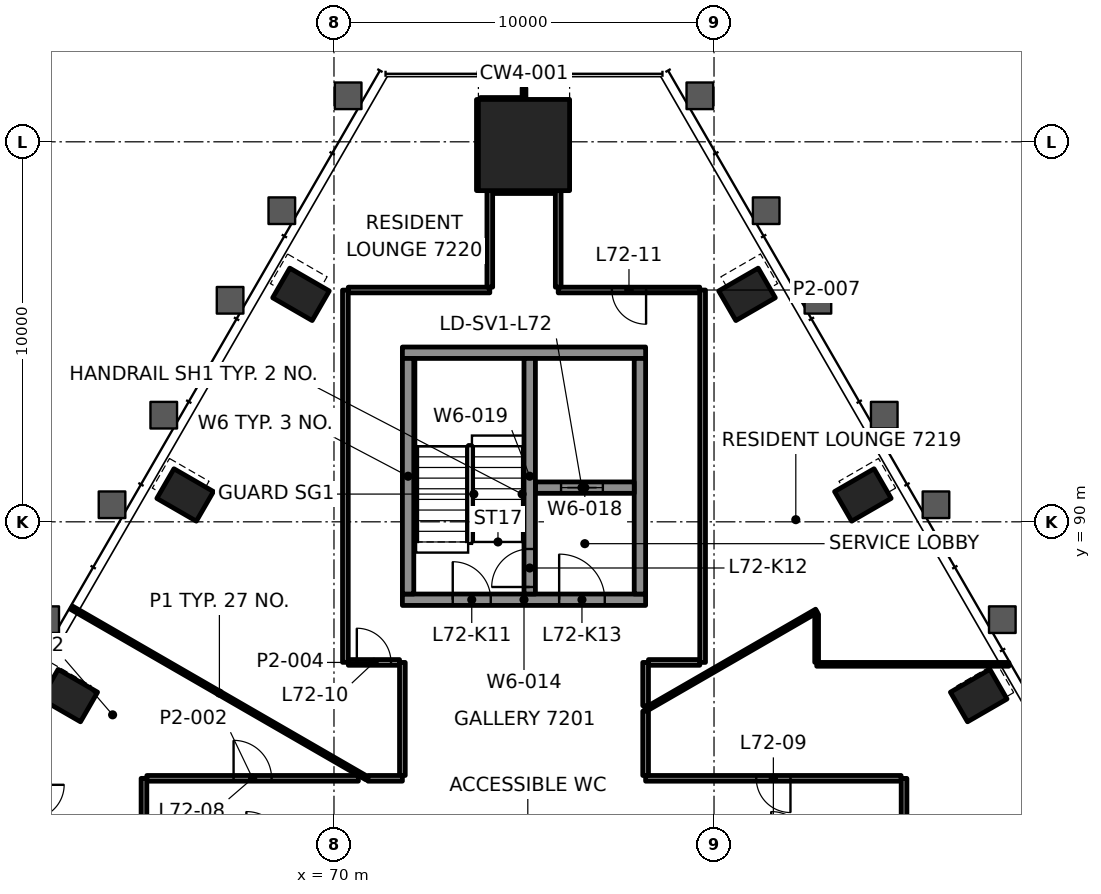
"""IFC4 building model, lengths in metres.
Left out: names, types, materials, properties, quantities, classifications, styles, units other than length and angle.
Written with IfcOpenShell. Run it as: python <this file> out.ifc"""

import sys

from ifc_helpers import new_model, si_unit, direction, frame, frame_2d, origin, origin_2d, place, context, subcontext, project, spatial, rectangle, hollow_rectangle, extrude, element, fill, save


model = new_model("IFC4")
c1 = context("Model", 3, precision=1e-05, world=origin(), true_north=direction((0.0, 1.0)))
c2 = subcontext(c1, "Body", "Model", "MODEL_VIEW")
j1 = project(units=[si_unit("LENGTHUNIT", "METRE"), si_unit("PLANEANGLEUNIT", "RADIAN")], contexts=[c1])
p1 = place(None, origin())
s1 = spatial("IfcSite", under=j1, at=p1, CompositionType="ELEMENT")
p2 = place(p1, origin())
s2 = spatial("IfcBuilding", under=s1, at=p2, CompositionType="ELEMENT")
p3 = place(p2, frame((0.0, 0.0, 298.6)))
s3 = spatial("IfcBuildingStorey", under=s2, at=p3, CompositionType="ELEMENT", Elevation=298.6)
p4 = place(p3, frame((75.0, 99.915, 0.0), z_axis=(0.0, 0.0, 1.0), x_axis=(-1.0, 0.0, 0.0)))
e1 = element("IfcColumn", 1, at=p4, inside=s3, PredefinedType="COLUMN", context=c2, shape_type="SweptSolid", body=[
    extrude(rectangle(XDim=2.4, YDim=2.4, at=origin_2d()), origin(), (0.0, 0.0, 1.0), 3.5),
])
for number, where, z_axis, x_axis in (
    (2, (86.965, 85.427, -0.0), (0.0, 0.0, 1.0), (-0.5, 0.866, 0.0)),
    (3, (83.917, 90.707, -0.0), (0.0, 0.0, 1.0), (-0.5, 0.866, 0.0)),
    (4, (80.869, 95.986, -0.0), (0.0, 0.0, 1.0), (-0.5, 0.866, 0.0)),
    (5, (69.131, 95.986, -0.0), (0.0, 0.0, 1.0), (-0.5, -0.866, 0.0)),
    (6, (66.083, 90.707, -0.0), (0.0, 0.0, 1.0), (-0.5, -0.866, 0.0)),
    (7, (63.035, 85.427, -0.0), (0.0, 0.0, 1.0), (-0.5, -0.866, 0.0)),
):
    element("IfcColumn", number, at=place(p3, frame(where, z_axis=z_axis, x_axis=x_axis)), inside=s3, PredefinedType="COLUMN", context=c2, shape_type="SweptSolid", body=[
        extrude(hollow_rectangle(XDim=0.9, YDim=1.2, WallThickness=0.06, at=origin_2d()), origin(), (0.0, 0.0, 1.0), 3.5),
    ])
p5 = place(p3, frame((71.8, 87.95, 0.0), z_axis=(0.0, 0.0, 1.0), x_axis=(1.0, 0.0, 0.0)))
e8 = element("IfcWall", 8, at=p5, inside=s3, PredefinedType="SHEAR", context=c2, shape_type="SweptSolid", body=[
    extrude(rectangle(XDim=6.4, YDim=0.3, at=frame_2d((3.2, 0.0))), origin(), (0.0, 0.0, 1.0), 3.3),
])
p6 = place(p5, frame((1.325, 0.0, 0.0)))
e9 = element("IfcOpeningElement", 9, at=p6, cuts=e8, PredefinedType="OPENING", context=c2, shape_type="SweptSolid", body=[
    extrude(rectangle(XDim=1.0, YDim=2.1, at=frame_2d((0.5, 1.05))), frame((0.0, 0.16, 0.0), z_axis=(0.0, -1.0, 0.0), x_axis=(1.0, 0.0, 0.0)), (0.0, 0.0, 1.0), 0.32),
])
p7 = place(p5, frame((4.125, 0.0, 0.0)))
e10 = element("IfcOpeningElement", 10, at=p7, cuts=e8, PredefinedType="OPENING", context=c2, shape_type="SweptSolid", body=[
    extrude(rectangle(XDim=1.2, YDim=2.1, at=frame_2d((0.6, 1.05))), frame((0.0, 0.16, 0.0), z_axis=(0.0, -1.0, 0.0), x_axis=(1.0, 0.0, 0.0)), (0.0, 0.0, 1.0), 0.32),
])
p8 = place(p3, frame((71.8, 94.45, 0.0), z_axis=(0.0, 0.0, 1.0), x_axis=(1.0, 0.0, 0.0)))
e11 = element("IfcWall", 11, at=p8, inside=s3, PredefinedType="SHEAR", context=c2, shape_type="SweptSolid", body=[
    extrude(rectangle(XDim=6.4, YDim=0.3, at=frame_2d((3.2, 0.0))), origin(), (0.0, 0.0, 1.0), 3.3),
])
for number, where, z_axis, x_axis in (
    (12, (71.95, 88.1, 0.0), (0.0, 0.0, 1.0), (0.0, 1.0, 0.0)),
    (13, (78.05, 88.1, 0.0), (0.0, 0.0, 1.0), (0.0, 1.0, 0.0)),
):
    element("IfcWall", number, at=place(p3, frame(where, z_axis=z_axis, x_axis=x_axis)), inside=s3, PredefinedType="SHEAR", context=c2, shape_type="SweptSolid", body=[
        extrude(rectangle(XDim=6.2, YDim=0.3, at=frame_2d((3.1, 0.0))), origin(), (0.0, 0.0, 1.0), 3.3),
    ])
p9 = place(p3, frame((75.3, 90.9, 0.0), z_axis=(0.0, 0.0, 1.0), x_axis=(1.0, 0.0, 0.0)))
e14 = element("IfcWall", 14, at=p9, inside=s3, PredefinedType="SHEAR", context=c2, shape_type="SweptSolid", body=[
    extrude(rectangle(XDim=2.6, YDim=0.3, at=frame_2d((1.3, 0.0))), origin(), (0.0, 0.0, 1.0), 3.3),
])
p10 = place(p9, frame((0.675, 0.0, 0.0)))
e15 = element("IfcOpeningElement", 15, at=p10, cuts=e14, PredefinedType="OPENING", context=c2, shape_type="SweptSolid", body=[
    extrude(rectangle(XDim=1.1, YDim=2.1, at=frame_2d((0.55, 1.05))), frame((0.0, 0.16, 0.0), z_axis=(0.0, -1.0, 0.0), x_axis=(1.0, 0.0, 0.0)), (0.0, 0.0, 1.0), 0.32),
])
p11 = place(p3, frame((75.15, 88.1, 0.0), z_axis=(0.0, 0.0, 1.0), x_axis=(0.0, 1.0, 0.0)))
e16 = element("IfcWall", 16, at=p11, inside=s3, PredefinedType="SHEAR", context=c2, shape_type="SweptSolid", body=[
    extrude(rectangle(XDim=6.2, YDim=0.3, at=frame_2d((3.1, 0.0))), origin(), (0.0, 0.0, 1.0), 3.3),
])
p12 = place(p11, frame((0.185, 0.0, 0.0)))
e17 = element("IfcOpeningElement", 17, at=p12, cuts=e16, PredefinedType="OPENING", context=c2, shape_type="SweptSolid", body=[
    extrude(rectangle(XDim=1.0, YDim=2.1, at=frame_2d((0.5, 1.05))), frame((0.0, 0.16, 0.0), z_axis=(0.0, -1.0, 0.0), x_axis=(1.0, 0.0, 0.0)), (0.0, 0.0, 1.0), 0.32),
])
p13 = place(p3, frame((65.075, 83.25, 0.0), z_axis=(0.0, 0.0, 1.0), x_axis=(1.0, 0.0, 0.0)))
e18 = element("IfcWall", 18, at=p13, inside=s3, PredefinedType="PARTITIONING", context=c2, shape_type="SweptSolid", body=[
    extrude(rectangle(XDim=5.565, YDim=0.15, at=frame_2d((2.783, 0.0))), origin(), (0.0, 0.0, 1.0), 2.7),
])
p14 = place(p13, frame((2.283, 0.0, 0.0)))
e19 = element("IfcOpeningElement", 19, at=p14, cuts=e18, PredefinedType="OPENING", context=c2, shape_type="SweptSolid", body=[
    extrude(rectangle(XDim=1.0, YDim=2.1, at=frame_2d((0.5, 1.05))), frame((0.0, 0.085, 0.0), z_axis=(0.0, -1.0, 0.0), x_axis=(1.0, 0.0, 0.0)), (0.0, 0.0, 1.0), 0.17),
])
p15 = place(p3, frame((84.923, 83.25, 0.0), z_axis=(0.0, 0.0, 1.0), x_axis=(-1.0, 0.0, 0.0)))
e20 = element("IfcWall", 20, at=p15, inside=s3, PredefinedType="PARTITIONING", context=c2, shape_type="SweptSolid", body=[
    extrude(rectangle(XDim=6.723, YDim=0.15, at=frame_2d((3.362, 0.0))), origin(), (0.0, 0.0, 1.0), 2.7),
])
p16 = place(p15, frame((2.911, 0.0, 0.0)))
e21 = element("IfcOpeningElement", 21, at=p16, cuts=e20, PredefinedType="OPENING", context=c2, shape_type="SweptSolid", body=[
    extrude(rectangle(XDim=0.9, YDim=2.1, at=frame_2d((0.45, 1.05))), frame((0.0, 0.085, 0.0), z_axis=(0.0, -1.0, 0.0), x_axis=(1.0, 0.0, 0.0)), (0.0, 0.0, 1.0), 0.17),
])
p17 = place(p3, frame((82.702, 86.25, 0.0), z_axis=(0.0, 0.0, 1.0), x_axis=(1.0, 0.0, 0.0)))
e22 = element("IfcWall", 22, at=p17, inside=s3, PredefinedType="PARTITIONING", context=c2, shape_type="SweptSolid", body=[
    extrude(rectangle(XDim=5.058, YDim=0.1, at=frame_2d((2.529, 0.0))), origin(), (0.0, 0.0, 1.0), 2.688),
])
p18 = place(p3, frame((70.377, 86.3, 0.0), z_axis=(0.0, 0.0, 1.0), x_axis=(1.0, 0.0, 0.0)))
e23 = element("IfcWall", 23, at=p18, inside=s3, PredefinedType="PARTITIONING", context=c2, shape_type="SweptSolid", body=[
    extrude(rectangle(XDim=1.348, YDim=0.15, at=frame_2d((0.674, 0.0))), origin(), (0.0, 0.0, 1.0), 2.7),
])
p19 = place(p18, frame((0.224, 0.0, 0.0)))
e24 = element("IfcOpeningElement", 24, at=p19, cuts=e23, PredefinedType="OPENING", context=c2, shape_type="SweptSolid", body=[
    extrude(rectangle(XDim=0.9, YDim=2.1, at=frame_2d((0.45, 1.05))), frame((0.0, 0.085, 0.0), z_axis=(0.0, -1.0, 0.0), x_axis=(1.0, 0.0, 0.0)), (0.0, 0.0, 1.0), 0.17),
])
p20 = place(p3, frame((78.275, 86.3, 0.0), z_axis=(0.0, 0.0, 1.0), x_axis=(1.0, 0.0, 0.0)))
e25 = element("IfcWall", 25, at=p20, inside=s3, PredefinedType="PARTITIONING", context=c2, shape_type="SweptSolid", body=[
    extrude(rectangle(XDim=1.35, YDim=0.15, at=frame_2d((0.675, 0.0))), origin(), (0.0, 0.0, 1.0), 2.7),
])
p21 = place(p3, frame((70.377, 96.1, 0.0), z_axis=(0.0, 0.0, 1.0), x_axis=(1.0, 0.0, 0.0)))
e26 = element("IfcWall", 26, at=p21, inside=s3, PredefinedType="PARTITIONING", context=c2, shape_type="SweptSolid", body=[
    extrude(rectangle(XDim=3.723, YDim=0.15, at=frame_2d((1.861, 0.0))), origin(), (0.0, 0.0, 1.0), 2.7),
])
p22 = place(p3, frame((79.625, 96.1, 0.0), z_axis=(0.0, 0.0, 1.0), x_axis=(-1.0, 0.0, 0.0)))
e27 = element("IfcWall", 27, at=p22, inside=s3, PredefinedType="PARTITIONING", context=c2, shape_type="SweptSolid", body=[
    extrude(rectangle(XDim=3.724, YDim=0.15, at=frame_2d((1.862, 0.0))), origin(), (0.0, 0.0, 1.0), 2.7),
])
p23 = place(p22, frame((1.412, 0.0, 0.0)))
e28 = element("IfcOpeningElement", 28, at=p23, cuts=e27, PredefinedType="OPENING", context=c2, shape_type="SweptSolid", body=[
    extrude(rectangle(XDim=0.9, YDim=2.1, at=frame_2d((0.45, 1.05))), frame((0.0, 0.085, 0.0), z_axis=(0.0, -1.0, 0.0), x_axis=(1.0, 0.0, 0.0)), (0.0, 0.0, 1.0), 0.17),
])
p24 = place(p3, frame((74.182, 98.715, 0.0), z_axis=(0.0, 0.0, 1.0), x_axis=(1.0, 0.0, 0.0)))
e29 = element("IfcWall", 29, at=p24, inside=s3, PredefinedType="PARTITIONING", context=c2, shape_type="SweptSolid", body=[
    extrude(rectangle(XDim=1.642, YDim=0.15, at=frame_2d((0.821, 0.0))), origin(), (0.0, 0.0, 1.0), 2.697),
])
p25 = place(p3, frame((73.852, 101.115, 0.0), z_axis=(0.0, 0.0, 1.0), x_axis=(1.0, 0.0, 0.0)))
e30 = element("IfcWall", 30, at=p25, inside=s3, PredefinedType="PARTITIONING", context=c2, shape_type="SweptSolid", body=[
    extrude(rectangle(XDim=1.148, YDim=0.1, at=frame_2d((0.574, 0.0))), origin(), (0.0, 0.0, 1.0), 2.7),
])
p26 = place(p3, frame((78.2, 85.06, 0.0), z_axis=(0.0, 0.0, 1.0), x_axis=(0.866025161861, 0.500000419024, 0.0)))
e31 = element("IfcWall", 31, at=p26, inside=s3, PredefinedType="PARTITIONING", context=c2, shape_type="SweptSolid", body=[
    extrude(rectangle(XDim=5.195, YDim=0.1, at=frame_2d((2.598, 0.0))), origin(), (0.0, 0.0, 1.0), 2.7),
])
p27 = place(p3, frame((85.0, 70.266, 0.0), z_axis=(0.0, 0.0, 1.0), x_axis=(0.0, 1.0, 0.0)))
e32 = element("IfcWall", 32, at=p27, inside=s3, PredefinedType="PARTITIONING", context=c2, shape_type="SweptSolid", body=[
    extrude(rectangle(XDim=12.982, YDim=0.15, at=frame_2d((6.491, 0.0))), origin(), (0.0, 0.0, 1.0), 2.7),
])
p28 = place(p3, frame((82.7, 86.302, 0.0), z_axis=(0.0, 0.0, 1.0), x_axis=(0.0, 1.0, 0.0)))
e33 = element("IfcWall", 33, at=p28, inside=s3, PredefinedType="PARTITIONING", context=c2, shape_type="SweptSolid", body=[
    extrude(rectangle(XDim=1.267, YDim=0.1, at=frame_2d((0.634, 0.0))), origin(), (0.0, 0.0, 1.0), 2.7),
])
p29 = place(p3, frame((79.7, 86.301, 0.0), z_axis=(0.0, 0.0, 1.0), x_axis=(0.0, 1.0, 0.0)))
e34 = element("IfcWall", 34, at=p29, inside=s3, PredefinedType="PARTITIONING", context=c2, shape_type="SweptSolid", body=[
    extrude(rectangle(XDim=9.799, YDim=0.15, at=frame_2d((4.899, 0.0))), origin(), (0.0, 0.0, 1.0), 2.7),
])
p30 = place(p3, frame((78.2, 83.325, 0.0), z_axis=(0.0, 0.0, 1.0), x_axis=(0.0, 1.0, 0.0)))
e35 = element("IfcWall", 35, at=p30, inside=s3, PredefinedType="PARTITIONING", context=c2, shape_type="SweptSolid", body=[
    extrude(rectangle(XDim=1.692, YDim=0.15, at=frame_2d((0.846, 0.0))), origin(), (0.0, 0.0, 1.0), 2.7),
])
p31 = place(p3, frame((75.9, 96.175, 0.0), z_axis=(0.0, 0.0, 1.0), x_axis=(0.0, 1.0, 0.0)))
e36 = element("IfcWall", 36, at=p31, inside=s3, PredefinedType="PARTITIONING", context=c2, shape_type="SweptSolid", body=[
    extrude(rectangle(XDim=2.54, YDim=0.15, at=frame_2d((1.27, 0.0))), origin(), (0.0, 0.0, 1.0), 2.7),
])
p32 = place(p3, frame((75.0, 101.165, 0.0), z_axis=(0.0, 0.0, 1.0), x_axis=(0.0, 1.0, 0.0)))
e37 = element("IfcWall", 37, at=p32, inside=s3, PredefinedType="PARTITIONING", context=c2, shape_type="SweptSolid", body=[
    extrude(rectangle(XDim=0.25, YDim=0.1, at=frame_2d((0.125, 0.0))), origin(), (0.0, 0.0, 1.0), 2.7),
])
p33 = place(p3, frame((74.1, 96.175, 0.0), z_axis=(0.0, 0.0, 1.0), x_axis=(0.0, 1.0, 0.0)))
e38 = element("IfcWall", 38, at=p33, inside=s3, PredefinedType="PARTITIONING", context=c2, shape_type="SweptSolid", body=[
    extrude(rectangle(XDim=2.54, YDim=0.15, at=frame_2d((1.27, 0.0))), origin(), (0.0, 0.0, 1.0), 2.7),
])
p34 = place(p3, frame((73.8, 98.717, 0.0), z_axis=(0.0, 0.0, 1.0), x_axis=(0.0, 1.0, 0.0)))
e39 = element("IfcWall", 39, at=p34, inside=s3, PredefinedType="PARTITIONING", context=c2, shape_type="SweptSolid", body=[
    extrude(rectangle(XDim=2.396, YDim=0.1, at=frame_2d((1.198, 0.0))), origin(), (0.0, 0.0, 1.0), 2.7),
])
p35 = place(p3, frame((71.8, 83.325, 0.0), z_axis=(0.0, 0.0, 1.0), x_axis=(0.0, 1.0, 0.0)))
e40 = element("IfcWall", 40, at=p35, inside=s3, PredefinedType="PARTITIONING", context=c2, shape_type="SweptSolid", body=[
    extrude(rectangle(XDim=2.975, YDim=0.15, at=frame_2d((1.488, 0.0))), origin(), (0.0, 0.0, 1.0), 2.7),
])
p36 = place(p3, frame((70.3, 86.302, 0.0), z_axis=(0.0, 0.0, 1.0), x_axis=(0.0, 1.0, 0.0)))
e41 = element("IfcWall", 41, at=p36, inside=s3, PredefinedType="PARTITIONING", context=c2, shape_type="SweptSolid", body=[
    extrude(rectangle(XDim=9.796, YDim=0.15, at=frame_2d((4.898, 0.0))), origin(), (0.0, 0.0, 1.0), 2.7),
])
p37 = place(p3, frame((65.0, 70.266, 0.0), z_axis=(0.0, 0.0, 1.0), x_axis=(0.0, 1.0, 0.0)))
e42 = element("IfcWall", 42, at=p37, inside=s3, PredefinedType="PARTITIONING", context=c2, shape_type="SweptSolid", body=[
    extrude(rectangle(XDim=12.984, YDim=0.15, at=frame_2d((6.492, 0.0))), origin(), (0.0, 0.0, 1.0), 2.7),
])
p38 = place(p3, frame((70.871, 83.25, 0.0), z_axis=(0.0, 0.0, 1.0), x_axis=(-0.866022943116, 0.500004261978, 0.0)))
e43 = element("IfcWall", 43, at=p38, inside=s3, PredefinedType="PARTITIONING", context=c2, shape_type="SweptSolid", body=[
    extrude(rectangle(XDim=8.974, YDim=0.1, at=frame_2d((4.487, 0.0))), origin(), (0.0, 0.0, 1.0), 2.688),
])
p39 = place(p3, frame((70.896, 83.25, 0.0), z_axis=(0.0, 0.0, 1.0), x_axis=(1.0, 0.0, 0.0)))
e44 = element("IfcWall", 44, at=p39, inside=s3, PredefinedType="PARTITIONING", context=c2, shape_type="SweptSolid", body=[
    extrude(rectangle(XDim=0.905, YDim=0.15, at=frame_2d((0.452, 0.0))), origin(), (0.0, 0.0, 1.0), 2.7),
])
p40 = place(p3, frame((78.2, 85.161, 0.0), z_axis=(0.0, 0.0, 1.0), x_axis=(0.0, 1.0, 0.0)))
e45 = element("IfcWall", 45, at=p40, inside=s3, PredefinedType="PARTITIONING", context=c2, shape_type="SweptSolid", body=[
    extrude(rectangle(XDim=1.139, YDim=0.15, at=frame_2d((0.57, 0.0))), origin(), (0.0, 0.0, 1.0), 2.7),
])
p41 = place(p14, origin())
e46 = element("IfcDoor", 46, at=p41, inside=s3, OperationType="SINGLE_SWING_RIGHT", PredefinedType="DOOR", context=c2, shape_type="SweptSolid", body=[
    extrude(rectangle(XDim=1.0, YDim=2.1, at=frame_2d((0.5, 1.05))), frame((0.0, 0.025, 0.0), z_axis=(0.0, -1.0, 0.0), x_axis=(1.0, 0.0, 0.0)), (0.0, 0.0, 1.0), 0.05),
])
fill(e19, e46)
p42 = place(p16, origin())
e47 = element("IfcDoor", 47, at=p42, inside=s3, OperationType="SINGLE_SWING_RIGHT", PredefinedType="DOOR", context=c2, shape_type="SweptSolid", body=[
    extrude(rectangle(XDim=0.9, YDim=2.1, at=frame_2d((0.45, 1.05))), frame((0.0, 0.025, 0.0), z_axis=(0.0, -1.0, 0.0), x_axis=(1.0, 0.0, 0.0)), (0.0, 0.0, 1.0), 0.05),
])
fill(e21, e47)
p43 = place(p19, origin())
e48 = element("IfcDoor", 48, at=p43, inside=s3, OperationType="SINGLE_SWING_LEFT", PredefinedType="DOOR", context=c2, shape_type="SweptSolid", body=[
    extrude(rectangle(XDim=0.9, YDim=2.1, at=frame_2d((0.45, 1.05))), frame((0.0, 0.025, 0.0), z_axis=(0.0, -1.0, 0.0), x_axis=(1.0, 0.0, 0.0)), (0.0, 0.0, 1.0), 0.05),
])
fill(e24, e48)
p44 = place(p23, origin())
e49 = element("IfcDoor", 49, at=p44, inside=s3, OperationType="SINGLE_SWING_LEFT", PredefinedType="DOOR", context=c2, shape_type="SweptSolid", body=[
    extrude(rectangle(XDim=0.9, YDim=2.1, at=frame_2d((0.45, 1.05))), frame((0.0, 0.025, 0.0), z_axis=(0.0, -1.0, 0.0), x_axis=(1.0, 0.0, 0.0)), (0.0, 0.0, 1.0), 0.05),
])
fill(e28, e49)
p45 = place(p10, origin())
e50 = element("IfcDoor", 50, at=p45, inside=s3, OperationType="DOUBLE_DOOR_SLIDING", PredefinedType="DOOR", context=c2, shape_type="SweptSolid", body=[
    extrude(rectangle(XDim=1.1, YDim=2.1, at=frame_2d((0.55, 1.05))), frame((0.0, 0.025, 0.0), z_axis=(0.0, -1.0, 0.0), x_axis=(1.0, 0.0, 0.0)), (0.0, 0.0, 1.0), 0.05),
])
fill(e15, e50)
p46 = place(p6, origin())
e51 = element("IfcDoor", 51, at=p46, inside=s3, OperationType="SINGLE_SWING_RIGHT", PredefinedType="DOOR", context=c2, shape_type="SweptSolid", body=[
    extrude(rectangle(XDim=1.0, YDim=2.1, at=frame_2d((0.5, 1.05))), frame((0.0, 0.025, 0.0), z_axis=(0.0, -1.0, 0.0), x_axis=(1.0, 0.0, 0.0)), (0.0, 0.0, 1.0), 0.05),
])
fill(e9, e51)
p47 = place(p12, origin())
e52 = element("IfcDoor", 52, at=p47, inside=s3, OperationType="SINGLE_SWING_LEFT", PredefinedType="DOOR", context=c2, shape_type="SweptSolid", body=[
    extrude(rectangle(XDim=1.0, YDim=2.1, at=frame_2d((0.5, 1.05))), frame((0.0, 0.025, 0.0), z_axis=(0.0, -1.0, 0.0), x_axis=(1.0, 0.0, 0.0)), (0.0, 0.0, 1.0), 0.05),
])
fill(e17, e52)
p48 = place(p7, origin())
e53 = element("IfcDoor", 53, at=p48, inside=s3, OperationType="SINGLE_SWING_RIGHT", PredefinedType="DOOR", context=c2, shape_type="SweptSolid", body=[
    extrude(rectangle(XDim=1.2, YDim=2.1, at=frame_2d((0.6, 1.05))), frame((0.0, 0.025, 0.0), z_axis=(0.0, -1.0, 0.0), x_axis=(1.0, 0.0, 0.0)), (0.0, 0.0, 1.0), 0.05),
])
fill(e10, e53)
save(model, sys.argv[1])
